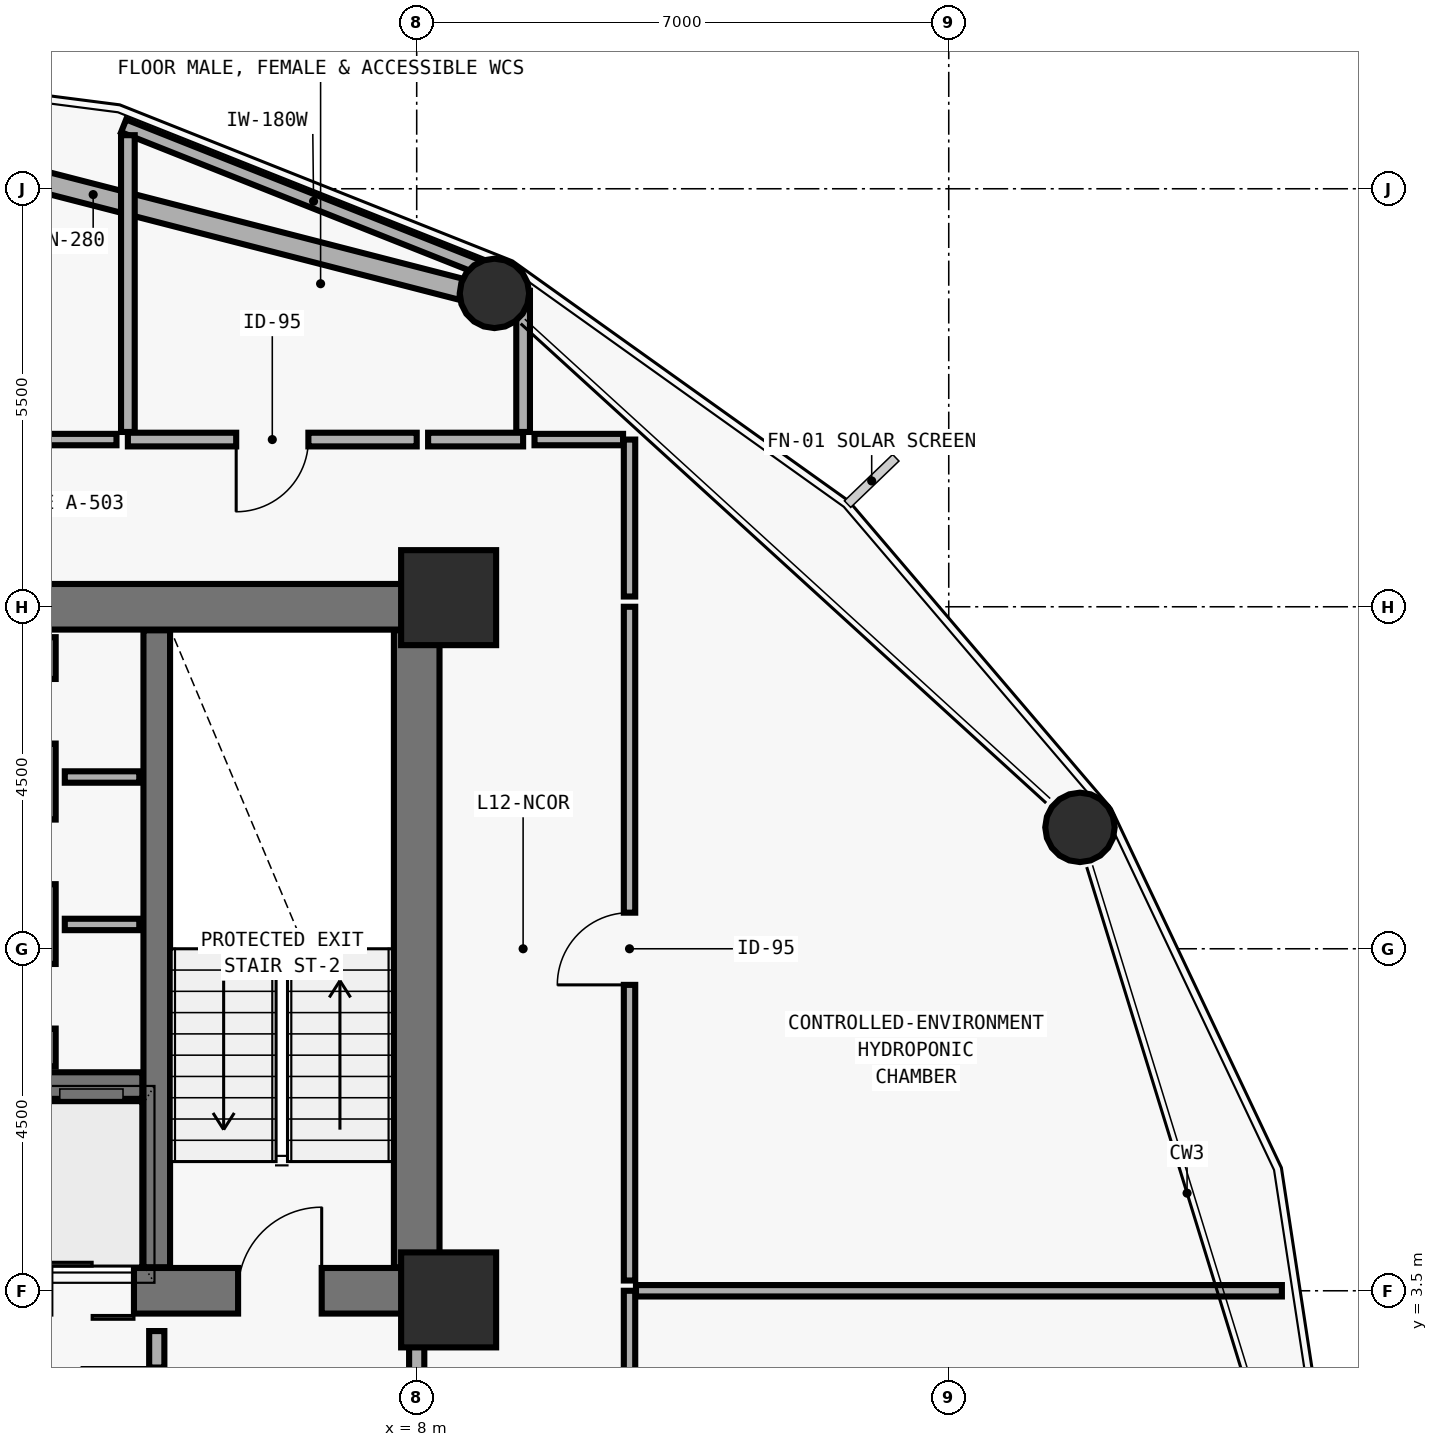
"""IFC4 building model, lengths in metres.
Left out: names, types, materials, properties, quantities, classifications, styles, units other than length and angle.
Written with IfcOpenShell. Run it as: python <this file> out.ifc"""

import sys

from ifc_helpers import new_model, si_unit, direction, frame, frame_2d, origin, origin_2d, place, context, subcontext, project, spatial, rectangle, hollow_circle, extrude, element, fill, save


model = new_model("IFC4")
c1 = context("Model", 3, precision=1e-05, world=origin(), true_north=direction((0.0, 1.0)))
c2 = subcontext(c1, "Body", "Model", "MODEL_VIEW")
j1 = project(units=[si_unit("LENGTHUNIT", "METRE"), si_unit("PLANEANGLEUNIT", "RADIAN")], contexts=[c1])
p1 = place(None, origin())
s1 = spatial("IfcSite", under=j1, at=p1, CompositionType="ELEMENT")
p2 = place(p1, origin())
s2 = spatial("IfcBuilding", under=s1, at=p2, CompositionType="ELEMENT")
p3 = place(p2, frame((0.0, 0.0, 51.0)))
s3 = spatial("IfcBuildingStorey", under=s2, at=p3, CompositionType="ELEMENT", Elevation=51.0)
p4 = place(p3, frame((-2.0, 3.5, 0.0), z_axis=(0.0, 0.0, 1.0), x_axis=(1.0, 0.0, 0.0)))
e1 = element("IfcWall", 1, at=p4, inside=s3, PredefinedType="SHEAR", context=c2, shape_type="SweptSolid", body=[
    extrude(rectangle(XDim=10.0, YDim=0.6, at=frame_2d((5.0, 0.0))), origin(), (0.0, 0.0, 1.0), 3.892),
])
p5 = place(p4, frame((1.65, 0.0, 0.0)))
e2 = element("IfcOpeningElement", 2, at=p5, cuts=e1, PredefinedType="OPENING", context=c2, shape_type="SweptSolid", body=[
    extrude(rectangle(XDim=1.1, YDim=2.15, at=frame_2d((0.55, 1.075))), frame((0.0, 0.31, 0.0), z_axis=(0.0, -1.0, 0.0), x_axis=(1.0, 0.0, 0.0)), (0.0, 0.0, 1.0), 0.62),
])
p6 = place(p4, frame((7.65, 0.0, 0.0)))
e3 = element("IfcOpeningElement", 3, at=p6, cuts=e1, PredefinedType="OPENING", context=c2, shape_type="SweptSolid", body=[
    extrude(rectangle(XDim=1.1, YDim=2.15, at=frame_2d((0.55, 1.075))), frame((0.0, 0.31, 0.0), z_axis=(0.0, -1.0, 0.0), x_axis=(1.0, 0.0, 0.0)), (0.0, 0.0, 1.0), 0.62),
])
p7 = place(p4, frame((3.72, 0.0, 0.0)))
e4 = element("IfcOpeningElement", 4, at=p7, cuts=e1, PredefinedType="OPENING", context=c2, shape_type="SweptSolid", body=[
    extrude(rectangle(XDim=1.1, YDim=2.2, at=frame_2d((0.55, 1.1))), frame((0.0, 0.31, 0.0), z_axis=(0.0, -1.0, 0.0), x_axis=(1.0, 0.0, 0.0)), (0.0, 0.0, 1.0), 0.62),
])
p8 = place(p4, frame((5.18, 0.0, 0.0)))
e5 = element("IfcOpeningElement", 5, at=p8, cuts=e1, PredefinedType="OPENING", context=c2, shape_type="SweptSolid", body=[
    extrude(rectangle(XDim=1.1, YDim=2.2, at=frame_2d((0.55, 1.1))), frame((0.0, 0.31, 0.0), z_axis=(0.0, -1.0, 0.0), x_axis=(1.0, 0.0, 0.0)), (0.0, 0.0, 1.0), 0.62),
])
p9 = place(p3, frame((-2.0, 12.5, 0.0), z_axis=(0.0, 0.0, 1.0), x_axis=(1.0, 0.0, 0.0)))
e6 = element("IfcWall", 6, at=p9, inside=s3, PredefinedType="SHEAR", context=c2, shape_type="SweptSolid", body=[
    extrude(rectangle(XDim=10.0, YDim=0.6, at=frame_2d((5.0, 0.0))), origin(), (0.0, 0.0, 1.0), 3.892),
])
p10 = place(p9, frame((3.92, 0.0, 0.0)))
e7 = element("IfcOpeningElement", 7, at=p10, cuts=e6, PredefinedType="OPENING", context=c2, shape_type="SweptSolid", body=[
    extrude(rectangle(XDim=0.85, YDim=2.1, at=frame_2d((0.425, 1.05))), frame((0.0, 0.31, 0.0), z_axis=(0.0, -1.0, 0.0), x_axis=(1.0, 0.0, 0.0)), (0.0, 0.0, 1.0), 0.62),
])
p11 = place(p3, frame((8.0, 3.81, 0.0), z_axis=(0.0, 0.0, 1.0), x_axis=(0.0, 1.0, 0.0)))
e8 = element("IfcWall", 8, at=p11, inside=s3, PredefinedType="SHEAR", context=c2, shape_type="SweptSolid", body=[
    extrude(rectangle(XDim=8.38, YDim=0.6, at=frame_2d((4.19, 0.0))), origin(), (0.0, 0.0, 1.0), 3.892),
])
p12 = place(p3, frame((4.58, 3.81, 0.0), z_axis=(0.0, 0.0, 1.0), x_axis=(0.0, 1.0, 0.0)))
e9 = element("IfcWall", 9, at=p12, inside=s3, PredefinedType="SHEAR", context=c2, shape_type="SweptSolid", body=[
    extrude(rectangle(XDim=8.38, YDim=0.35, at=frame_2d((4.19, 0.0))), origin(), (0.0, 0.0, 1.0), 3.892),
])
p13 = place(p3, frame((1.61, 6.2, 0.0), z_axis=(0.0, 0.0, 1.0), x_axis=(1.0, 0.0, 0.0)))
e10 = element("IfcWall", 10, at=p13, inside=s3, PredefinedType="SHEAR", context=c2, shape_type="SweptSolid", body=[
    extrude(rectangle(XDim=2.78, YDim=0.35, at=frame_2d((1.39, 0.0))), origin(), (0.0, 0.0, 1.0), 3.892),
])
for number, where, z_axis, x_axis in (
    (11, (8.42, 12.62, 0.0), (0.0, 0.0, 1.0), (1.0, 0.0, 0.0)),
    (12, (8.42, 3.38, 0.0), (0.0, 0.0, 1.0), (1.0, 0.0, 0.0)),
):
    element("IfcColumn", number, at=place(p3, frame(where, z_axis=z_axis, x_axis=x_axis)), inside=s3, PredefinedType="COLUMN", context=c2, shape_type="SweptSolid", body=[
        extrude(rectangle(XDim=1.25, YDim=1.25, at=origin_2d()), origin(), (0.0, 0.0, 1.0), 3.875),
    ])
p14 = place(p3, frame((16.663, 9.569, 0.0), z_axis=(0.032615211628, 0.01467054886, 0.99936030688), x_axis=(-0.410218260947, 0.911987378414, 0.0)))
e13 = element("IfcColumn", 13, at=p14, inside=s3, PredefinedType="COLUMN", context=c2, shape_type="SweptSolid", body=[
    extrude(hollow_circle(Radius=0.457, WallThickness=0.032, at=origin_2d()), origin(), (0.0, 0.0, 1.0), 3.877),
])
p15 = place(p3, frame((8.987, 16.574, 0.0), z_axis=(0.018828767594, 0.025440876615, 0.999498994151), x_axis=(-0.803803843436, 0.594894428682, 0.0)))
e14 = element("IfcColumn", 14, at=p15, inside=s3, PredefinedType="COLUMN", context=c2, shape_type="SweptSolid", body=[
    extrude(hollow_circle(Radius=0.457, WallThickness=0.032, at=origin_2d()), origin(), (0.0, 0.0, 1.0), 3.877),
])
p16 = place(p3, frame((-1.101, 19.17, 0.0), z_axis=(0.0, 0.0, 1.0), x_axis=(0.968436738327, -0.249259470952, 0.0)))
e15 = element("IfcWall", 15, at=p16, inside=s3, PredefinedType="SOLIDWALL", context=c2, shape_type="SweptSolid", body=[
    extrude(rectangle(XDim=10.004, YDim=0.28, at=frame_2d((5.002, 0.0))), origin(), (0.0, 0.0, 1.0), 3.06),
])
p17 = place(p3, frame((3.15, 6.45, 0.0), z_axis=(0.0, 0.0, 1.0), x_axis=(0.0, 1.0, 0.0)))
e16 = element("IfcWall", 16, at=p17, inside=s3, PredefinedType="MOVABLE", context=c2, shape_type="SweptSolid", body=[
    extrude(rectangle(XDim=5.65, YDim=0.2, at=frame_2d((2.825, 0.0))), origin(), (0.0, 0.0, 1.0), 3.64),
])
p18 = place(p17, frame((0.5, 0.0, 0.0)))
e17 = element("IfcOpeningElement", 17, at=p18, cuts=e16, PredefinedType="OPENING", context=c2, shape_type="SweptSolid", body=[
    extrude(rectangle(XDim=0.85, YDim=2.1, at=frame_2d((0.425, 1.05))), frame((0.0, 0.11, 0.0), z_axis=(0.0, -1.0, 0.0), x_axis=(1.0, 0.0, 0.0)), (0.0, 0.0, 1.0), 0.22),
])
p19 = place(p17, frame((2.4, 0.0, 0.0)))
e18 = element("IfcOpeningElement", 18, at=p19, cuts=e16, PredefinedType="OPENING", context=c2, shape_type="SweptSolid", body=[
    extrude(rectangle(XDim=0.85, YDim=2.1, at=frame_2d((0.425, 1.05))), frame((0.0, 0.11, 0.0), z_axis=(0.0, -1.0, 0.0), x_axis=(1.0, 0.0, 0.0)), (0.0, 0.0, 1.0), 0.22),
])
p20 = place(p17, frame((4.25, 0.0, 0.0)))
e19 = element("IfcOpeningElement", 19, at=p20, cuts=e16, PredefinedType="OPENING", context=c2, shape_type="SweptSolid", body=[
    extrude(rectangle(XDim=0.85, YDim=2.1, at=frame_2d((0.425, 1.05))), frame((0.0, 0.11, 0.0), z_axis=(0.0, -1.0, 0.0), x_axis=(1.0, 0.0, 0.0)), (0.0, 0.0, 1.0), 0.22),
])
p21 = place(p3, frame((4.58, 0.83, 0.0), z_axis=(0.0, 0.0, 1.0), x_axis=(0.0, 1.0, 0.0)))
e20 = element("IfcWall", 20, at=p21, inside=s3, PredefinedType="MOVABLE", context=c2, shape_type="SweptSolid", body=[
    extrude(rectangle(XDim=2.14, YDim=0.2, at=frame_2d((1.07, 0.0))), origin(), (0.0, 0.0, 1.0), 3.64),
])
p22 = place(p21, frame((0.66, 0.0, 0.0)))
e21 = element("IfcOpeningElement", 21, at=p22, cuts=e20, PredefinedType="OPENING", context=c2, shape_type="SweptSolid", body=[
    extrude(rectangle(XDim=1.0, YDim=2.1, at=frame_2d((0.5, 1.05))), frame((0.0, 0.11, 0.0), z_axis=(0.0, -1.0, 0.0), x_axis=(1.0, 0.0, 0.0)), (0.0, 0.0, 1.0), 0.22),
])
p23 = place(p3, frame((8.0, 0.72, 0.0), z_axis=(0.0, 0.0, 1.0), x_axis=(0.0, 1.0, 0.0)))
e22 = element("IfcWall", 22, at=p23, inside=s3, PredefinedType="MOVABLE", context=c2, shape_type="SweptSolid", body=[
    extrude(rectangle(XDim=2.25, YDim=0.2, at=frame_2d((1.125, 0.0))), origin(), (0.0, 0.0, 1.0), 2.872),
])
p24 = place(p23, frame((0.845, 0.0, 0.0)))
e23 = element("IfcOpeningElement", 23, at=p24, cuts=e22, PredefinedType="OPENING", context=c2, shape_type="SweptSolid", body=[
    extrude(rectangle(XDim=0.85, YDim=2.1, at=frame_2d((0.425, 1.05))), frame((0.0, 0.11, 0.0), z_axis=(0.0, -1.0, 0.0), x_axis=(1.0, 0.0, 0.0)), (0.0, 0.0, 1.0), 0.22),
])
p25 = place(p3, frame((8.0, 14.7, 0.0), z_axis=(0.0, 0.0, 1.0), x_axis=(-1.0, 0.0, 0.0)))
e24 = element("IfcWall", 24, at=p25, inside=s3, PredefinedType="PLUMBINGWALL", context=c2, shape_type="SweptSolid", body=[
    extrude(rectangle(XDim=3.8, YDim=0.18, at=frame_2d((1.9, 0.0))), origin(), (0.0, 0.0, 1.0), 3.122),
])
p26 = place(p25, frame((1.425, 0.0, 0.0)))
e25 = element("IfcOpeningElement", 25, at=p26, cuts=e24, PredefinedType="OPENING", context=c2, shape_type="SweptSolid", body=[
    extrude(rectangle(XDim=0.95, YDim=2.1, at=frame_2d((0.475, 1.05))), frame((0.0, 0.1, 0.0), z_axis=(0.0, -1.0, 0.0), x_axis=(1.0, 0.0, 0.0)), (0.0, 0.0, 1.0), 0.2),
])
p27 = place(p3, frame((10.8, -1.69, 0.0), z_axis=(0.0, 0.0, 1.0), x_axis=(0.0, 1.0, 0.0)))
e26 = element("IfcWall", 26, at=p27, inside=s3, PredefinedType="PARTITIONING", context=c2, shape_type="SweptSolid", body=[
    extrude(rectangle(XDim=5.19, YDim=0.15, at=frame_2d((2.595, 0.0))), origin(), (0.0, 0.0, 1.0), 3.64),
])
p28 = place(p27, frame((2.065, 0.0, 0.0)))
e27 = element("IfcOpeningElement", 27, at=p28, cuts=e26, PredefinedType="OPENING", context=c2, shape_type="SweptSolid", body=[
    extrude(rectangle(XDim=0.95, YDim=2.1, at=frame_2d((0.475, 1.05))), frame((0.0, 0.085, 0.0), z_axis=(0.0, -1.0, 0.0), x_axis=(1.0, 0.0, 0.0)), (0.0, 0.0, 1.0), 0.17),
])
p29 = place(p3, frame((10.8, 3.635, 0.0), z_axis=(0.0, 0.0, 1.0), x_axis=(0.0, 1.0, 0.0)))
e28 = element("IfcWall", 28, at=p29, inside=s3, PredefinedType="PARTITIONING", context=c2, shape_type="SweptSolid", body=[
    extrude(rectangle(XDim=8.865, YDim=0.15, at=frame_2d((4.433, 0.0))), origin(), (0.0, 0.0, 1.0), 3.64),
])
p30 = place(p29, frame((3.89, 0.0, 0.0)))
e29 = element("IfcOpeningElement", 29, at=p30, cuts=e28, PredefinedType="OPENING", context=c2, shape_type="SweptSolid", body=[
    extrude(rectangle(XDim=0.95, YDim=2.1, at=frame_2d((0.475, 1.05))), frame((0.0, 0.085, 0.0), z_axis=(0.0, -1.0, 0.0), x_axis=(1.0, 0.0, 0.0)), (0.0, 0.0, 1.0), 0.17),
])
for number, where, z_axis, x_axis in (
    (30, (3.37, 8.32, 0.0), (0.0, 0.0, 1.0), (1.0, 0.0, 0.0)),
    (31, (3.37, 10.26, 0.0), (0.0, 0.0, 1.0), (1.0, 0.0, 0.0)),
):
    element("IfcWall", number, at=place(p3, frame(where, z_axis=z_axis, x_axis=x_axis)), inside=s3, PredefinedType="PARTITIONING", context=c2, shape_type="SweptSolid", body=[
        extrude(rectangle(XDim=0.98, YDim=0.15, at=frame_2d((0.49, 0.0))), origin(), (0.0, 0.0, 1.0), 3.64),
    ])
p31 = place(p3, frame((9.4, 14.7, 0.0), z_axis=(0.0, 0.0, 1.0), x_axis=(-1.0, 0.0, 0.0)))
e32 = element("IfcWall", 32, at=p31, inside=s3, PredefinedType="PLUMBINGWALL", context=c2, shape_type="SweptSolid", body=[
    extrude(rectangle(XDim=1.25, YDim=0.18, at=frame_2d((0.625, 0.0))), origin(), (0.0, 0.0, 1.0), 3.122),
])
p32 = place(p3, frame((4.05, 14.7, 0.0), z_axis=(0.0, 0.0, 1.0), x_axis=(-1.0, 0.0, 0.0)))
e33 = element("IfcWall", 33, at=p32, inside=s3, PredefinedType="PARTITIONING", context=c2, shape_type="SweptSolid", body=[
    extrude(rectangle(XDim=2.74, YDim=0.15, at=frame_2d((1.37, 0.0))), origin(), (0.0, 0.0, 1.0), 3.122),
])
p33 = place(p3, frame((4.144, 18.828, 0.0), z_axis=(0.0, 0.0, 1.0), x_axis=(0.929394329091, -0.369088310644, 0.0)))
e34 = element("IfcWall", 34, at=p33, inside=s3, PredefinedType="PLUMBINGWALL", context=c2, shape_type="SweptSolid", body=[
    extrude(rectangle(XDim=5.378, YDim=0.18, at=frame_2d((2.689, 0.0))), origin(), (0.0, 0.0, 1.0), 3.072),
])
p34 = place(p3, frame((4.2, 18.705, 0.0), z_axis=(0.0, 0.0, 1.0), x_axis=(0.0, -1.0, 0.0)))
e35 = element("IfcWall", 35, at=p34, inside=s3, PredefinedType="PLUMBINGWALL", context=c2, shape_type="SweptSolid", body=[
    extrude(rectangle(XDim=3.905, YDim=0.18, at=frame_2d((1.953, 0.0))), origin(), (0.0, 0.0, 1.0), 3.64),
])
p35 = place(p3, frame((10.885, 3.5, 0.0), z_axis=(0.0, 0.0, 1.0), x_axis=(1.0, 0.0, 0.0)))
e36 = element("IfcWall", 36, at=p35, inside=s3, PredefinedType="PARTITIONING", context=c2, shape_type="SweptSolid", body=[
    extrude(rectangle(XDim=8.498, YDim=0.15, at=frame_2d((4.249, 0.0))), origin(), (0.0, 0.0, 1.0), 3.64),
])
p36 = place(p3, frame((10.8, 12.635, 0.0), z_axis=(0.0, 0.0, 1.0), x_axis=(0.0, 1.0, 0.0)))
e37 = element("IfcWall", 37, at=p36, inside=s3, PredefinedType="PARTITIONING", context=c2, shape_type="SweptSolid", body=[
    extrude(rectangle(XDim=2.065, YDim=0.15, at=frame_2d((1.032, 0.0))), origin(), (0.0, 0.0, 1.0), 3.64),
])
p37 = place(p3, frame((10.715, 14.7, 0.0), z_axis=(0.0, 0.0, 1.0), x_axis=(-1.0, 0.0, 0.0)))
e38 = element("IfcWall", 38, at=p37, inside=s3, PredefinedType="PARTITIONING", context=c2, shape_type="SweptSolid", body=[
    extrude(rectangle(XDim=1.165, YDim=0.15, at=frame_2d((0.583, 0.0))), origin(), (0.0, 0.0, 1.0), 3.64),
])
p38 = place(p3, frame((9.4, 14.8, 0.0), z_axis=(0.0, 0.0, 1.0), x_axis=(0.0, 1.0, 0.0)))
e39 = element("IfcWall", 39, at=p38, inside=s3, PredefinedType="PLUMBINGWALL", context=c2, shape_type="SweptSolid", body=[
    extrude(rectangle(XDim=1.858, YDim=0.18, at=frame_2d((0.929, 0.0))), origin(), (0.0, 0.0, 1.0), 2.972),
])
p39 = place(p6, origin())
e40 = element("IfcDoor", 40, at=p39, inside=s3, OperationType="SINGLE_SWING_RIGHT", PredefinedType="DOOR", context=c2, shape_type="SweptSolid", body=[
    extrude(rectangle(XDim=1.1, YDim=2.15, at=frame_2d((0.55, 1.075))), frame((0.0, 0.025, 0.0), z_axis=(0.0, -1.0, 0.0), x_axis=(1.0, 0.0, 0.0)), (0.0, 0.0, 1.0), 0.05),
])
fill(e3, e40)
p40 = place(p8, origin())
e41 = element("IfcDoor", 41, at=p40, inside=s3, OperationType="DOUBLE_DOOR_SLIDING", PredefinedType="DOOR", context=c2, shape_type="SweptSolid", body=[
    extrude(rectangle(XDim=1.1, YDim=2.2, at=frame_2d((0.55, 1.1))), frame((0.0, 0.025, 0.0), z_axis=(0.0, -1.0, 0.0), x_axis=(1.0, 0.0, 0.0)), (0.0, 0.0, 1.0), 0.05),
])
fill(e5, e41)
p41 = place(p26, origin())
e42 = element("IfcDoor", 42, at=p41, inside=s3, OperationType="SINGLE_SWING_RIGHT", PredefinedType="DOOR", context=c2, shape_type="SweptSolid", body=[
    extrude(rectangle(XDim=0.95, YDim=2.1, at=frame_2d((0.475, 1.05))), frame((0.0, 0.025, 0.0), z_axis=(0.0, -1.0, 0.0), x_axis=(1.0, 0.0, 0.0)), (0.0, 0.0, 1.0), 0.05),
])
fill(e25, e42)
p42 = place(p30, origin())
e43 = element("IfcDoor", 43, at=p42, inside=s3, OperationType="SINGLE_SWING_LEFT", PredefinedType="DOOR", context=c2, shape_type="SweptSolid", body=[
    extrude(rectangle(XDim=0.95, YDim=2.1, at=frame_2d((0.475, 1.05))), frame((0.0, 0.025, 0.0), z_axis=(0.0, -1.0, 0.0), x_axis=(1.0, 0.0, 0.0)), (0.0, 0.0, 1.0), 0.05),
])
fill(e29, e43)
save(model, sys.argv[1])
